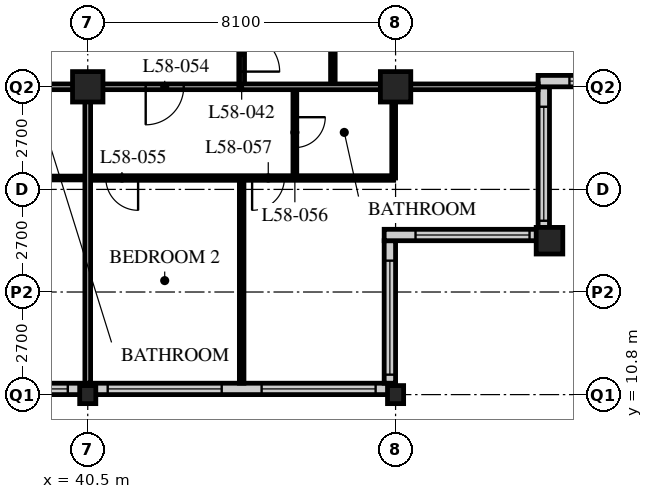
"""IFC4 building model, lengths in metres.
Left out: names, types, materials, properties, quantities, classifications, styles, units other than length and angle.
Written with IfcOpenShell. Run it as: python <this file> out.ifc"""

import sys

from ifc_helpers import new_model, si_unit, direction, frame, frame_2d, origin, origin_2d, place, context, subcontext, project, spatial, rectangle, hollow_rectangle, i_section, extrude, element, fill, save


model = new_model("IFC4")
c1 = context("Model", 3, precision=1e-05, world=origin(), true_north=direction((0.0, 1.0)))
c2 = subcontext(c1, "Body", "Model", "MODEL_VIEW")
j1 = project(units=[si_unit("LENGTHUNIT", "METRE"), si_unit("PLANEANGLEUNIT", "RADIAN")], contexts=[c1])
p1 = place(None, origin())
s1 = spatial("IfcSite", under=j1, at=p1, CompositionType="ELEMENT")
p2 = place(p1, origin())
s2 = spatial("IfcBuilding", under=s1, at=p2, CompositionType="ELEMENT")
p3 = place(p2, frame((0.0, 0.0, 224.4)))
s3 = spatial("IfcBuildingStorey", under=s2, at=p3, CompositionType="ELEMENT", Elevation=224.4)
p4 = place(p3, frame((40.5, 10.8, 0.0), z_axis=(0.0, 0.0, 1.0), x_axis=(1.0, 0.0, 0.0)))
e1 = element("IfcColumn", 1, at=p4, inside=s3, PredefinedType="COLUMN", context=c2, shape_type="SweptSolid", body=[
    extrude(i_section(OverallWidth=0.424, OverallDepth=0.475, WebThickness=0.048, FlangeThickness=0.077, FilletRadius=0.015, at=origin_2d()), origin(), (0.0, 0.0, 1.0), 3.6),
])
p5 = place(p3, frame((40.5, 18.9, 0.0), z_axis=(0.0, 0.0, 1.0), x_axis=(1.0, 0.0, 0.0)))
e2 = element("IfcColumn", 2, at=p5, inside=s3, PredefinedType="COLUMN", context=c2, shape_type="SweptSolid", body=[
    extrude(hollow_rectangle(XDim=0.8, YDim=0.8, WallThickness=0.08, at=origin_2d()), origin(), (0.0, 0.0, 1.0), 3.6),
])
p6 = place(p3, frame((48.6, 10.8, 0.0), z_axis=(0.0, 0.0, 1.0), x_axis=(1.0, 0.0, 0.0)))
e3 = element("IfcColumn", 3, at=p6, inside=s3, PredefinedType="COLUMN", context=c2, shape_type="SweptSolid", body=[
    extrude(i_section(OverallWidth=0.424, OverallDepth=0.475, WebThickness=0.048, FlangeThickness=0.077, FilletRadius=0.015, at=origin_2d()), origin(), (0.0, 0.0, 1.0), 3.6),
])
p7 = place(p3, frame((48.6, 18.9, 0.0), z_axis=(0.0, 0.0, 1.0), x_axis=(1.0, 0.0, 0.0)))
e4 = element("IfcColumn", 4, at=p7, inside=s3, PredefinedType="COLUMN", context=c2, shape_type="SweptSolid", body=[
    extrude(hollow_rectangle(XDim=0.8, YDim=0.8, WallThickness=0.08, at=origin_2d()), origin(), (0.0, 0.0, 1.0), 3.6),
])
p8 = place(p3, frame((52.65, 14.85, 0.0), z_axis=(0.0, 0.0, 1.0), x_axis=(1.0, 0.0, 0.0)))
e5 = element("IfcColumn", 5, at=p8, inside=s3, PredefinedType="COLUMN", context=c2, shape_type="SweptSolid", body=[
    extrude(hollow_rectangle(XDim=0.7, YDim=0.7, WallThickness=0.07, at=origin_2d()), origin(), (0.0, 0.0, 1.0), 3.6),
])
p9 = place(p3, frame((8.4, 10.95, 0.0), z_axis=(0.0, 0.0, 1.0), x_axis=(1.0, 0.0, 0.0)))
e6 = element("IfcWall", 6, at=p9, inside=s3, PredefinedType="SOLIDWALL", context=c2, shape_type="SweptSolid", body=[
    extrude(rectangle(XDim=40.2, YDim=0.3, at=frame_2d((20.1, 0.0))), origin(), (0.0, 0.0, 1.0), 3.39),
])
p10 = place(p9, frame((0.225, 0.0, 0.6)))
e7 = element("IfcOpeningElement", 7, at=p10, cuts=e6, PredefinedType="OPENING", context=c2, shape_type="SweptSolid", body=[
    extrude(rectangle(XDim=3.0, YDim=2.0, at=frame_2d((1.5, 1.0))), frame((0.0, 0.16, 0.0), z_axis=(0.0, -1.0, 0.0), x_axis=(1.0, 0.0, 0.0)), (0.0, 0.0, 1.0), 0.32),
])
p11 = place(p9, frame((4.275, 0.0, 0.6)))
e8 = element("IfcOpeningElement", 8, at=p11, cuts=e6, PredefinedType="OPENING", context=c2, shape_type="SweptSolid", body=[
    extrude(rectangle(XDim=3.0, YDim=2.0, at=frame_2d((1.5, 1.0))), frame((0.0, 0.16, 0.0), z_axis=(0.0, -1.0, 0.0), x_axis=(1.0, 0.0, 0.0)), (0.0, 0.0, 1.0), 0.32),
])
p12 = place(p9, frame((8.325, 0.0, 0.6)))
e9 = element("IfcOpeningElement", 9, at=p12, cuts=e6, PredefinedType="OPENING", context=c2, shape_type="SweptSolid", body=[
    extrude(rectangle(XDim=3.0, YDim=2.0, at=frame_2d((1.5, 1.0))), frame((0.0, 0.16, 0.0), z_axis=(0.0, -1.0, 0.0), x_axis=(1.0, 0.0, 0.0)), (0.0, 0.0, 1.0), 0.32),
])
p13 = place(p9, frame((12.375, 0.0, 0.6)))
e10 = element("IfcOpeningElement", 10, at=p13, cuts=e6, PredefinedType="OPENING", context=c2, shape_type="SweptSolid", body=[
    extrude(rectangle(XDim=3.0, YDim=2.0, at=frame_2d((1.5, 1.0))), frame((0.0, 0.16, 0.0), z_axis=(0.0, -1.0, 0.0), x_axis=(1.0, 0.0, 0.0)), (0.0, 0.0, 1.0), 0.32),
])
p14 = place(p9, frame((16.425, 0.0, 0.6)))
e11 = element("IfcOpeningElement", 11, at=p14, cuts=e6, PredefinedType="OPENING", context=c2, shape_type="SweptSolid", body=[
    extrude(rectangle(XDim=3.0, YDim=2.0, at=frame_2d((1.5, 1.0))), frame((0.0, 0.16, 0.0), z_axis=(0.0, -1.0, 0.0), x_axis=(1.0, 0.0, 0.0)), (0.0, 0.0, 1.0), 0.32),
])
p15 = place(p9, frame((20.475, 0.0, 0.6)))
e12 = element("IfcOpeningElement", 12, at=p15, cuts=e6, PredefinedType="OPENING", context=c2, shape_type="SweptSolid", body=[
    extrude(rectangle(XDim=3.0, YDim=2.0, at=frame_2d((1.5, 1.0))), frame((0.0, 0.16, 0.0), z_axis=(0.0, -1.0, 0.0), x_axis=(1.0, 0.0, 0.0)), (0.0, 0.0, 1.0), 0.32),
])
p16 = place(p9, frame((24.525, 0.0, 0.6)))
e13 = element("IfcOpeningElement", 13, at=p16, cuts=e6, PredefinedType="OPENING", context=c2, shape_type="SweptSolid", body=[
    extrude(rectangle(XDim=3.0, YDim=2.0, at=frame_2d((1.5, 1.0))), frame((0.0, 0.16, 0.0), z_axis=(0.0, -1.0, 0.0), x_axis=(1.0, 0.0, 0.0)), (0.0, 0.0, 1.0), 0.32),
])
p17 = place(p9, frame((28.575, 0.0, 0.6)))
e14 = element("IfcOpeningElement", 14, at=p17, cuts=e6, PredefinedType="OPENING", context=c2, shape_type="SweptSolid", body=[
    extrude(rectangle(XDim=3.0, YDim=2.0, at=frame_2d((1.5, 1.0))), frame((0.0, 0.16, 0.0), z_axis=(0.0, -1.0, 0.0), x_axis=(1.0, 0.0, 0.0)), (0.0, 0.0, 1.0), 0.32),
])
p18 = place(p9, frame((32.625, 0.0, 0.6)))
e15 = element("IfcOpeningElement", 15, at=p18, cuts=e6, PredefinedType="OPENING", context=c2, shape_type="SweptSolid", body=[
    extrude(rectangle(XDim=3.0, YDim=2.0, at=frame_2d((1.5, 1.0))), frame((0.0, 0.16, 0.0), z_axis=(0.0, -1.0, 0.0), x_axis=(1.0, 0.0, 0.0)), (0.0, 0.0, 1.0), 0.32),
])
p19 = place(p9, frame((36.675, 0.0, 0.6)))
e16 = element("IfcOpeningElement", 16, at=p19, cuts=e6, PredefinedType="OPENING", context=c2, shape_type="SweptSolid", body=[
    extrude(rectangle(XDim=3.0, YDim=2.0, at=frame_2d((1.5, 1.0))), frame((0.0, 0.16, 0.0), z_axis=(0.0, -1.0, 0.0), x_axis=(1.0, 0.0, 0.0)), (0.0, 0.0, 1.0), 0.32),
])
p20 = place(p3, frame((48.45, 11.1, 0.0), z_axis=(0.0, 0.0, 1.0), x_axis=(0.0, 1.0, 0.0)))
e17 = element("IfcWall", 17, at=p20, inside=s3, PredefinedType="SOLIDWALL", context=c2, shape_type="SweptSolid", body=[
    extrude(rectangle(XDim=3.75, YDim=0.3, at=frame_2d((1.875, 0.0))), origin(), (0.0, 0.0, 1.0), 3.39),
])
p21 = place(p20, frame((0.225, 0.0, 0.6)))
e18 = element("IfcOpeningElement", 18, at=p21, cuts=e17, PredefinedType="OPENING", context=c2, shape_type="SweptSolid", body=[
    extrude(rectangle(XDim=3.0, YDim=2.0, at=frame_2d((1.5, 1.0))), frame((0.0, 0.16, 0.0), z_axis=(0.0, -1.0, 0.0), x_axis=(1.0, 0.0, 0.0)), (0.0, 0.0, 1.0), 0.32),
])
p22 = place(p3, frame((48.3, 15.0, 0.0), z_axis=(0.0, 0.0, 1.0), x_axis=(1.0, 0.0, 0.0)))
e19 = element("IfcWall", 19, at=p22, inside=s3, PredefinedType="SOLIDWALL", context=c2, shape_type="SweptSolid", body=[
    extrude(rectangle(XDim=4.35, YDim=0.3, at=frame_2d((2.175, 0.0))), origin(), (0.0, 0.0, 1.0), 3.39),
])
p23 = place(p22, frame((0.825, 0.0, 0.6)))
e20 = element("IfcOpeningElement", 20, at=p23, cuts=e19, PredefinedType="OPENING", context=c2, shape_type="SweptSolid", body=[
    extrude(rectangle(XDim=3.0, YDim=2.0, at=frame_2d((1.5, 1.0))), frame((0.0, 0.16, 0.0), z_axis=(0.0, -1.0, 0.0), x_axis=(1.0, 0.0, 0.0)), (0.0, 0.0, 1.0), 0.32),
])
p24 = place(p3, frame((52.5, 15.15, 0.0), z_axis=(0.0, 0.0, 1.0), x_axis=(0.0, 1.0, 0.0)))
e21 = element("IfcWall", 21, at=p24, inside=s3, PredefinedType="SOLIDWALL", context=c2, shape_type="SweptSolid", body=[
    extrude(rectangle(XDim=3.75, YDim=0.3, at=frame_2d((1.875, 0.0))), origin(), (0.0, 0.0, 1.0), 3.39),
])
p25 = place(p24, frame((0.225, 0.0, 0.6)))
e22 = element("IfcOpeningElement", 22, at=p25, cuts=e21, PredefinedType="OPENING", context=c2, shape_type="SweptSolid", body=[
    extrude(rectangle(XDim=3.0, YDim=2.0, at=frame_2d((1.5, 1.0))), frame((0.0, 0.16, 0.0), z_axis=(0.0, -1.0, 0.0), x_axis=(1.0, 0.0, 0.0)), (0.0, 0.0, 1.0), 0.32),
])
p26 = place(p3, frame((52.35, 19.05, 0.0), z_axis=(0.0, 0.0, 1.0), x_axis=(1.0, 0.0, 0.0)))
e23 = element("IfcWall", 23, at=p26, inside=s3, PredefinedType="SOLIDWALL", context=c2, shape_type="SweptSolid", body=[
    extrude(rectangle(XDim=4.35, YDim=0.3, at=frame_2d((2.175, 0.0))), origin(), (0.0, 0.0, 1.0), 3.39),
])
p27 = place(p26, frame((0.825, 0.0, 0.6)))
e24 = element("IfcOpeningElement", 24, at=p27, cuts=e23, PredefinedType="OPENING", context=c2, shape_type="SweptSolid", body=[
    extrude(rectangle(XDim=3.0, YDim=2.0, at=frame_2d((1.5, 1.0))), frame((0.0, 0.16, 0.0), z_axis=(0.0, -1.0, 0.0), x_axis=(1.0, 0.0, 0.0)), (0.0, 0.0, 1.0), 0.32),
])
p28 = place(p3, frame((8.1, 18.9, 0.0), z_axis=(0.0, 0.0, 1.0), x_axis=(1.0, 0.0, 0.0)))
e25 = element("IfcWall", 25, at=p28, inside=s3, PredefinedType="PARTITIONING", context=c2, shape_type="SweptSolid", body=[
    extrude(rectangle(XDim=36.45, YDim=0.15, at=frame_2d((18.225, 0.0))), origin(), (0.0, 0.0, 1.0), 2.628),
])
p29 = place(p28, frame((4.45, 0.0, 0.0)))
e26 = element("IfcOpeningElement", 26, at=p29, cuts=e25, PredefinedType="OPENING", context=c2, shape_type="SweptSolid", body=[
    extrude(rectangle(XDim=1.0, YDim=2.1, at=frame_2d((0.5, 1.05))), frame((0.0, 0.085, 0.0), z_axis=(0.0, -1.0, 0.0), x_axis=(1.0, 0.0, 0.0)), (0.0, 0.0, 1.0), 0.17),
])
p30 = place(p28, frame((17.1, 0.0, 0.0)))
e27 = element("IfcOpeningElement", 27, at=p30, cuts=e25, PredefinedType="OPENING", context=c2, shape_type="SweptSolid", body=[
    extrude(rectangle(XDim=1.0, YDim=2.1, at=frame_2d((0.5, 1.05))), frame((0.0, 0.085, 0.0), z_axis=(0.0, -1.0, 0.0), x_axis=(1.0, 0.0, 0.0)), (0.0, 0.0, 1.0), 0.17),
])
p31 = place(p28, frame((29.05, 0.0, 0.0)))
e28 = element("IfcOpeningElement", 28, at=p31, cuts=e25, PredefinedType="OPENING", context=c2, shape_type="SweptSolid", body=[
    extrude(rectangle(XDim=1.0, YDim=2.1, at=frame_2d((0.5, 1.05))), frame((0.0, 0.085, 0.0), z_axis=(0.0, -1.0, 0.0), x_axis=(1.0, 0.0, 0.0)), (0.0, 0.0, 1.0), 0.17),
])
p32 = place(p28, frame((2.625, 0.0, 0.0)))
e29 = element("IfcOpeningElement", 29, at=p32, cuts=e25, PredefinedType="OPENING", context=c2, shape_type="SweptSolid", body=[
    extrude(rectangle(XDim=1.0, YDim=2.1, at=frame_2d((0.5, 1.05))), frame((0.0, 0.085, 0.0), z_axis=(0.0, -1.0, 0.0), x_axis=(1.0, 0.0, 0.0)), (0.0, 0.0, 1.0), 0.17),
])
p33 = place(p28, frame((33.925, 0.0, 0.0)))
e30 = element("IfcOpeningElement", 30, at=p33, cuts=e25, PredefinedType="OPENING", context=c2, shape_type="SweptSolid", body=[
    extrude(rectangle(XDim=1.0, YDim=2.1, at=frame_2d((0.5, 1.05))), frame((0.0, 0.085, 0.0), z_axis=(0.0, -1.0, 0.0), x_axis=(1.0, 0.0, 0.0)), (0.0, 0.0, 1.0), 0.17),
])
p34 = place(p3, frame((44.55, 18.9, 0.0), z_axis=(0.0, 0.0, 1.0), x_axis=(0.0, 1.0, 0.0)))
e31 = element("IfcWall", 31, at=p34, inside=s3, PredefinedType="PARTITIONING", context=c2, shape_type="SweptSolid", body=[
    extrude(rectangle(XDim=24.3, YDim=0.15, at=frame_2d((12.15, 0.0))), origin(), (0.0, 0.0, 1.0), 3.39),
])
p35 = place(p34, frame((0.4, 0.0, 0.0)))
e32 = element("IfcOpeningElement", 32, at=p35, cuts=e31, PredefinedType="OPENING", context=c2, shape_type="SweptSolid", body=[
    extrude(rectangle(XDim=1.0, YDim=2.1, at=frame_2d((0.5, 1.05))), frame((0.0, 0.085, 0.0), z_axis=(0.0, -1.0, 0.0), x_axis=(1.0, 0.0, 0.0)), (0.0, 0.0, 1.0), 0.17),
])
p36 = place(p34, frame((16.6, 0.0, 0.0)))
e33 = element("IfcOpeningElement", 33, at=p36, cuts=e31, PredefinedType="OPENING", context=c2, shape_type="SweptSolid", body=[
    extrude(rectangle(XDim=1.0, YDim=2.1, at=frame_2d((0.5, 1.05))), frame((0.0, 0.085, 0.0), z_axis=(0.0, -1.0, 0.0), x_axis=(1.0, 0.0, 0.0)), (0.0, 0.0, 1.0), 0.17),
])
p37 = place(p3, frame((38.3, 16.5, 0.0), z_axis=(0.0, 0.0, 1.0), x_axis=(1.0, 0.0, 0.0)))
e34 = element("IfcWall", 34, at=p37, inside=s3, PredefinedType="PARTITIONING", context=c2, shape_type="SweptSolid", body=[
    extrude(rectangle(XDim=2.2, YDim=0.1, at=frame_2d((1.1, 0.0))), origin(), (0.0, 0.0, 1.0), 3.39),
])
p38 = place(p3, frame((46.95, 18.9, 0.0), z_axis=(0.0, 0.0, 1.0), x_axis=(0.0, 1.0, 0.0)))
e35 = element("IfcWall", 35, at=p38, inside=s3, PredefinedType="PARTITIONING", context=c2, shape_type="SweptSolid", body=[
    extrude(rectangle(XDim=24.3, YDim=0.12, at=frame_2d((12.15, 0.0))), origin(), (0.0, 0.0, 1.0), 3.39),
])
p39 = place(p38, frame((0.975, 0.0, 0.0)))
e36 = element("IfcOpeningElement", 36, at=p39, cuts=e35, PredefinedType="OPENING", context=c2, shape_type="SweptSolid", body=[
    extrude(rectangle(XDim=0.85, YDim=2.1, at=frame_2d((0.425, 1.05))), frame((0.0, 0.07, 0.0), z_axis=(0.0, -1.0, 0.0), x_axis=(1.0, 0.0, 0.0)), (0.0, 0.0, 1.0), 0.14),
])
p40 = place(p38, frame((8.425, 0.0, 0.0)))
e37 = element("IfcOpeningElement", 37, at=p40, cuts=e35, PredefinedType="OPENING", context=c2, shape_type="SweptSolid", body=[
    extrude(rectangle(XDim=0.85, YDim=2.1, at=frame_2d((0.425, 1.05))), frame((0.0, 0.07, 0.0), z_axis=(0.0, -1.0, 0.0), x_axis=(1.0, 0.0, 0.0)), (0.0, 0.0, 1.0), 0.14),
])
p41 = place(p38, frame((12.475, 0.0, 0.0)))
e38 = element("IfcOpeningElement", 38, at=p41, cuts=e35, PredefinedType="OPENING", context=c2, shape_type="SweptSolid", body=[
    extrude(rectangle(XDim=0.85, YDim=2.1, at=frame_2d((0.425, 1.05))), frame((0.0, 0.07, 0.0), z_axis=(0.0, -1.0, 0.0), x_axis=(1.0, 0.0, 0.0)), (0.0, 0.0, 1.0), 0.14),
])
p42 = place(p38, frame((17.175, 0.0, 0.0)))
e39 = element("IfcOpeningElement", 39, at=p42, cuts=e35, PredefinedType="OPENING", context=c2, shape_type="SweptSolid", body=[
    extrude(rectangle(XDim=0.85, YDim=2.1, at=frame_2d((0.425, 1.05))), frame((0.0, 0.07, 0.0), z_axis=(0.0, -1.0, 0.0), x_axis=(1.0, 0.0, 0.0)), (0.0, 0.0, 1.0), 0.14),
])
p43 = place(p38, frame((20.575, 0.0, 0.0)))
e40 = element("IfcOpeningElement", 40, at=p43, cuts=e35, PredefinedType="OPENING", context=c2, shape_type="SweptSolid", body=[
    extrude(rectangle(XDim=0.85, YDim=2.1, at=frame_2d((0.425, 1.05))), frame((0.0, 0.07, 0.0), z_axis=(0.0, -1.0, 0.0), x_axis=(1.0, 0.0, 0.0)), (0.0, 0.0, 1.0), 0.14),
])
p44 = place(p3, frame((40.5, 16.5, 0.0), z_axis=(0.0, 0.0, 1.0), x_axis=(1.0, 0.0, 0.0)))
e41 = element("IfcWall", 41, at=p44, inside=s3, PredefinedType="PARTITIONING", context=c2, shape_type="SweptSolid", body=[
    extrude(rectangle(XDim=8.05, YDim=0.12, at=frame_2d((4.025, 0.0))), origin(), (0.0, 0.0, 1.0), 3.39),
])
p45 = place(p44, frame((0.475, 0.0, 0.0)))
e42 = element("IfcOpeningElement", 42, at=p45, cuts=e41, PredefinedType="OPENING", context=c2, shape_type="SweptSolid", body=[
    extrude(rectangle(XDim=0.85, YDim=2.1, at=frame_2d((0.425, 1.05))), frame((0.0, 0.07, 0.0), z_axis=(0.0, -1.0, 0.0), x_axis=(1.0, 0.0, 0.0)), (0.0, 0.0, 1.0), 0.14),
])
p46 = place(p44, frame((4.325, 0.0, 0.0)))
e43 = element("IfcOpeningElement", 43, at=p46, cuts=e41, PredefinedType="OPENING", context=c2, shape_type="SweptSolid", body=[
    extrude(rectangle(XDim=0.85, YDim=2.1, at=frame_2d((0.425, 1.05))), frame((0.0, 0.07, 0.0), z_axis=(0.0, -1.0, 0.0), x_axis=(1.0, 0.0, 0.0)), (0.0, 0.0, 1.0), 0.14),
])
p47 = place(p3, frame((45.95, 18.9, 0.0), z_axis=(0.0, 0.0, 1.0), x_axis=(0.0, -1.0, 0.0)))
e44 = element("IfcWall", 44, at=p47, inside=s3, PredefinedType="PARTITIONING", context=c2, shape_type="SweptSolid", body=[
    extrude(rectangle(XDim=2.4, YDim=0.1, at=frame_2d((1.2, 0.0))), origin(), (0.0, 0.0, 1.0), 3.39),
])
p48 = place(p47, frame((0.8, 0.0, 0.0)))
e45 = element("IfcOpeningElement", 45, at=p48, cuts=e44, PredefinedType="OPENING", context=c2, shape_type="SweptSolid", body=[
    extrude(rectangle(XDim=0.8, YDim=2.1, at=frame_2d((0.4, 1.05))), frame((0.0, 0.06, 0.0), z_axis=(0.0, -1.0, 0.0), x_axis=(1.0, 0.0, 0.0)), (0.0, 0.0, 1.0), 0.12),
])
p49 = place(p3, frame((48.55, 18.9, 0.0), z_axis=(0.0, 0.0, 1.0), x_axis=(0.0, -1.0, 0.0)))
e46 = element("IfcWall", 46, at=p49, inside=s3, PredefinedType="PARTITIONING", context=c2, shape_type="SweptSolid", body=[
    extrude(rectangle(XDim=2.4, YDim=0.1, at=frame_2d((1.2, 0.0))), origin(), (0.0, 0.0, 1.0), 2.628),
])
p50 = place(p3, frame((44.55, 16.5, 0.0), z_axis=(0.0, 0.0, 1.0), x_axis=(0.0, -1.0, 0.0)))
e47 = element("IfcWall", 47, at=p50, inside=s3, PredefinedType="PARTITIONING", context=c2, shape_type="SweptSolid", body=[
    extrude(rectangle(XDim=5.4, YDim=0.12, at=frame_2d((2.7, 0.0))), origin(), (0.0, 0.0, 1.0), 3.39),
])
p51 = place(p3, frame((44.55, 18.9, 0.0), z_axis=(0.0, 0.0, 1.0), x_axis=(1.0, 0.0, 0.0)))
e48 = element("IfcWall", 48, at=p51, inside=s3, PredefinedType="PARTITIONING", context=c2, shape_type="SweptSolid", body=[
    extrude(rectangle(XDim=7.8, YDim=0.15, at=frame_2d((3.9, 0.0))), origin(), (0.0, 0.0, 1.0), 2.628),
])
p52 = place(p3, frame((40.5, 18.9, 0.0), z_axis=(0.0, 0.0, 1.0), x_axis=(0.0, -1.0, 0.0)))
e49 = element("IfcWall", 49, at=p52, inside=s3, PredefinedType="PARTITIONING", context=c2, shape_type="SweptSolid", body=[
    extrude(rectangle(XDim=7.8, YDim=0.15, at=frame_2d((3.9, 0.0))), origin(), (0.0, 0.0, 1.0), 2.628),
])
p53 = place(p17, origin())
e50 = element("IfcWindow", 50, at=p53, inside=s3, PartitioningType="SINGLE_PANEL", PredefinedType="WINDOW", context=c2, shape_type="SweptSolid", body=[
    extrude(rectangle(XDim=3.0, YDim=2.0, at=frame_2d((1.5, 1.0))), frame((0.0, 0.03, 0.0), z_axis=(0.0, -1.0, 0.0), x_axis=(1.0, 0.0, 0.0)), (0.0, 0.0, 1.0), 0.06),
])
fill(e14, e50)
p54 = place(p18, origin())
e51 = element("IfcWindow", 51, at=p54, inside=s3, PartitioningType="SINGLE_PANEL", PredefinedType="WINDOW", context=c2, shape_type="SweptSolid", body=[
    extrude(rectangle(XDim=3.0, YDim=2.0, at=frame_2d((1.5, 1.0))), frame((0.0, 0.03, 0.0), z_axis=(0.0, -1.0, 0.0), x_axis=(1.0, 0.0, 0.0)), (0.0, 0.0, 1.0), 0.06),
])
fill(e15, e51)
p55 = place(p19, origin())
e52 = element("IfcWindow", 52, at=p55, inside=s3, PartitioningType="SINGLE_PANEL", PredefinedType="WINDOW", context=c2, shape_type="SweptSolid", body=[
    extrude(rectangle(XDim=3.0, YDim=2.0, at=frame_2d((1.5, 1.0))), frame((0.0, 0.03, 0.0), z_axis=(0.0, -1.0, 0.0), x_axis=(1.0, 0.0, 0.0)), (0.0, 0.0, 1.0), 0.06),
])
fill(e16, e52)
p56 = place(p21, origin())
e53 = element("IfcWindow", 53, at=p56, inside=s3, PartitioningType="SINGLE_PANEL", PredefinedType="WINDOW", context=c2, shape_type="SweptSolid", body=[
    extrude(rectangle(XDim=3.0, YDim=2.0, at=frame_2d((1.5, 1.0))), frame((0.0, 0.03, 0.0), z_axis=(0.0, -1.0, 0.0), x_axis=(1.0, 0.0, 0.0)), (0.0, 0.0, 1.0), 0.06),
])
fill(e18, e53)
p57 = place(p23, origin())
e54 = element("IfcWindow", 54, at=p57, inside=s3, PartitioningType="SINGLE_PANEL", PredefinedType="WINDOW", context=c2, shape_type="SweptSolid", body=[
    extrude(rectangle(XDim=3.0, YDim=2.0, at=frame_2d((1.5, 1.0))), frame((0.0, 0.03, 0.0), z_axis=(0.0, -1.0, 0.0), x_axis=(1.0, 0.0, 0.0)), (0.0, 0.0, 1.0), 0.06),
])
fill(e20, e54)
p58 = place(p25, origin())
e55 = element("IfcWindow", 55, at=p58, inside=s3, PartitioningType="SINGLE_PANEL", PredefinedType="WINDOW", context=c2, shape_type="SweptSolid", body=[
    extrude(rectangle(XDim=3.0, YDim=2.0, at=frame_2d((1.5, 1.0))), frame((0.0, 0.03, 0.0), z_axis=(0.0, -1.0, 0.0), x_axis=(1.0, 0.0, 0.0)), (0.0, 0.0, 1.0), 0.06),
])
fill(e22, e55)
p59 = place(p27, origin())
e56 = element("IfcWindow", 56, at=p59, inside=s3, PartitioningType="SINGLE_PANEL", PredefinedType="WINDOW", context=c2, shape_type="SweptSolid", body=[
    extrude(rectangle(XDim=3.0, YDim=2.0, at=frame_2d((1.5, 1.0))), frame((0.0, 0.03, 0.0), z_axis=(0.0, -1.0, 0.0), x_axis=(1.0, 0.0, 0.0)), (0.0, 0.0, 1.0), 0.06),
])
fill(e24, e56)
p60 = place(p35, origin())
e57 = element("IfcDoor", 57, at=p60, inside=s3, OperationType="SINGLE_SWING_RIGHT", PredefinedType="DOOR", context=c2, shape_type="SweptSolid", body=[
    extrude(rectangle(XDim=1.0, YDim=2.1, at=frame_2d((0.5, 1.05))), frame((0.0, 0.025, 0.0), z_axis=(0.0, -1.0, 0.0), x_axis=(1.0, 0.0, 0.0)), (0.0, 0.0, 1.0), 0.05),
])
fill(e32, e57)
p61 = place(p33, origin())
e58 = element("IfcDoor", 58, at=p61, inside=s3, OperationType="SINGLE_SWING_RIGHT", PredefinedType="DOOR", context=c2, shape_type="SweptSolid", body=[
    extrude(rectangle(XDim=1.0, YDim=2.1, at=frame_2d((0.5, 1.05))), frame((0.0, 0.025, 0.0), z_axis=(0.0, -1.0, 0.0), x_axis=(1.0, 0.0, 0.0)), (0.0, 0.0, 1.0), 0.05),
])
fill(e30, e58)
p62 = place(p45, origin())
e59 = element("IfcDoor", 59, at=p62, inside=s3, OperationType="SINGLE_SWING_LEFT", PredefinedType="DOOR", context=c2, shape_type="SweptSolid", body=[
    extrude(rectangle(XDim=0.85, YDim=2.1, at=frame_2d((0.425, 1.05))), frame((0.0, 0.025, 0.0), z_axis=(0.0, -1.0, 0.0), x_axis=(1.0, 0.0, 0.0)), (0.0, 0.0, 1.0), 0.05),
])
fill(e42, e59)
p63 = place(p48, origin())
e60 = element("IfcDoor", 60, at=p63, inside=s3, OperationType="SINGLE_SWING_LEFT", PredefinedType="DOOR", context=c2, shape_type="SweptSolid", body=[
    extrude(rectangle(XDim=0.8, YDim=2.1, at=frame_2d((0.4, 1.05))), frame((0.0, 0.025, 0.0), z_axis=(0.0, -1.0, 0.0), x_axis=(1.0, 0.0, 0.0)), (0.0, 0.0, 1.0), 0.05),
])
fill(e45, e60)
p64 = place(p46, origin())
e61 = element("IfcDoor", 61, at=p64, inside=s3, OperationType="SINGLE_SWING_RIGHT", PredefinedType="DOOR", context=c2, shape_type="SweptSolid", body=[
    extrude(rectangle(XDim=0.85, YDim=2.1, at=frame_2d((0.425, 1.05))), frame((0.0, 0.025, 0.0), z_axis=(0.0, -1.0, 0.0), x_axis=(1.0, 0.0, 0.0)), (0.0, 0.0, 1.0), 0.05),
])
fill(e43, e61)
save(model, sys.argv[1])
